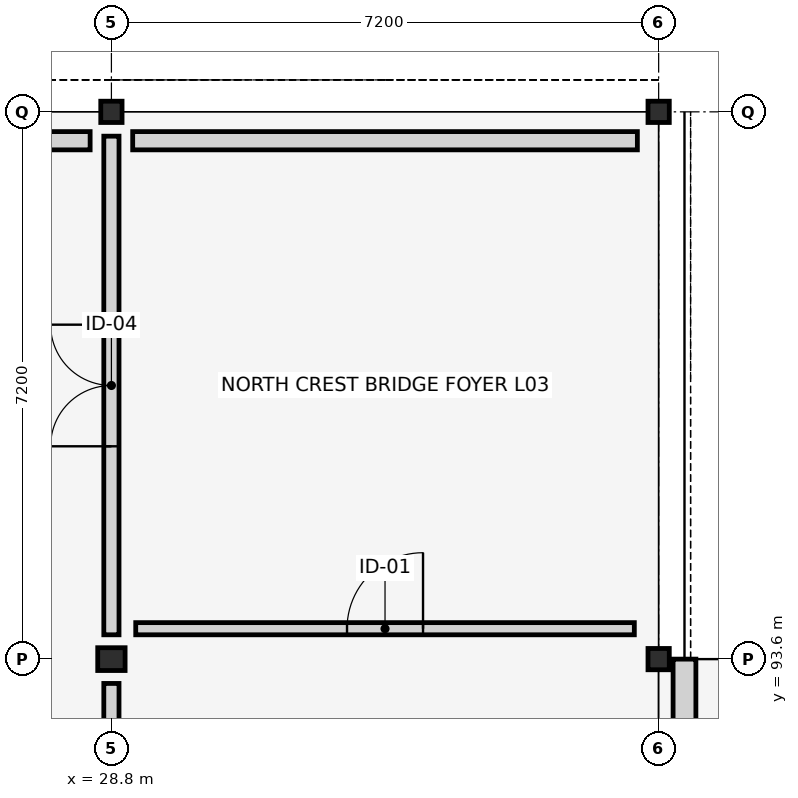
"""IFC4 building model, lengths in metres.
Left out: names, types, materials, properties, quantities, classifications, styles, units other than length and angle.
Written with IfcOpenShell. Run it as: python <this file> out.ifc"""

import sys

from ifc_helpers import new_model, si_unit, direction, frame, frame_2d, origin, origin_2d, place, context, subcontext, project, spatial, rectangle, i_section, extrude, element, fill, save


model = new_model("IFC4")
c1 = context("Model", 3, precision=1e-05, world=origin(), true_north=direction((0.0, 1.0)))
c2 = subcontext(c1, "Body", "Model", "MODEL_VIEW")
j1 = project(units=[si_unit("LENGTHUNIT", "METRE"), si_unit("PLANEANGLEUNIT", "RADIAN")], contexts=[c1])
p1 = place(None, origin())
s1 = spatial("IfcSite", under=j1, at=p1, CompositionType="ELEMENT")
p2 = place(p1, origin())
s2 = spatial("IfcBuilding", under=s1, at=p2, CompositionType="ELEMENT")
p3 = place(p2, frame((0.0, 0.0, 12.9)))
s3 = spatial("IfcBuildingStorey", under=s2, at=p3, CompositionType="ELEMENT", Elevation=12.9)
p4 = place(p3, frame((28.8, 93.6, 0.0), z_axis=(0.0, 0.0, 1.0), x_axis=(0.0, 1.0, 0.0)))
e1 = element("IfcColumn", 1, at=p4, inside=s3, PredefinedType="COLUMN", context=c2, shape_type="SweptSolid", body=[
    extrude(i_section(OverallWidth=0.3, OverallDepth=0.36, WebThickness=0.012, FlangeThickness=0.022, FilletRadius=0.027, at=origin_2d()), origin(), (0.0, 0.0, 1.0), 4.2),
])
for number, where, z_axis, x_axis in (
    (2, (28.8, 100.8, 0.0), (0.0, 0.0, 1.0), (1.0, 0.0, 0.0)),
    (3, (36.0, 93.6, 0.0), (0.0, 0.0, 1.0), (1.0, 0.0, 0.0)),
    (4, (36.0, 100.8, 0.0), (0.0, 0.0, 1.0), (0.0, 1.0, 0.0)),
):
    element("IfcColumn", number, at=place(p3, frame(where, z_axis=z_axis, x_axis=x_axis)), inside=s3, PredefinedType="COLUMN", context=c2, shape_type="SweptSolid", body=[
        extrude(i_section(OverallWidth=0.28, OverallDepth=0.28, WebThickness=0.01, FlangeThickness=0.018, FilletRadius=0.024, at=origin_2d()), origin(), (0.0, 0.0, 1.0), 4.2),
    ])
p5 = place(p3, frame((36.34, 86.4, 0.0), z_axis=(0.0, 0.0, 1.0), x_axis=(0.0, 1.0, 0.0)))
e5 = element("IfcWall", 5, at=p5, inside=s3, PredefinedType="STANDARD", context=c2, shape_type="SweptSolid", body=[
    extrude(rectangle(XDim=7.2, YDim=0.3, at=frame_2d((3.6, 0.0))), origin(), (0.0, 0.0, 1.0), 3.65),
])
p6 = place(p5, frame((2.65, 0.0, 0.0)))
e6 = element("IfcOpeningElement", 6, at=p6, cuts=e5, PredefinedType="OPENING", context=c2, shape_type="SweptSolid", body=[
    extrude(rectangle(XDim=1.9, YDim=2.45, at=frame_2d((0.95, 1.225))), frame((0.0, 0.16, 0.0), z_axis=(0.0, -1.0, 0.0), x_axis=(1.0, 0.0, 0.0)), (0.0, 0.0, 1.0), 0.32),
])
p7 = place(p3, frame((28.52, 100.42, 0.0), z_axis=(0.0, 0.0, 1.0), x_axis=(-1.0, 0.0, 0.0)))
e7 = element("IfcWall", 7, at=p7, inside=s3, PredefinedType="STANDARD", context=c2, shape_type="SweptSolid", body=[
    extrude(rectangle(XDim=6.64, YDim=0.24, at=frame_2d((3.32, 0.0))), origin(), (0.0, 0.0, 1.0), 3.58),
])
p8 = place(p3, frame((35.72, 100.42, 0.0), z_axis=(0.0, 0.0, 1.0), x_axis=(-1.0, 0.0, 0.0)))
e8 = element("IfcWall", 8, at=p8, inside=s3, PredefinedType="STANDARD", context=c2, shape_type="SweptSolid", body=[
    extrude(rectangle(XDim=6.64, YDim=0.24, at=frame_2d((3.32, 0.0))), origin(), (0.0, 0.0, 1.0), 3.58),
])
p9 = place(p3, frame((28.8, 72.32, 0.0), z_axis=(0.0, 0.0, 1.0), x_axis=(0.0, 1.0, 0.0)))
e9 = element("IfcWall", 9, at=p9, inside=s3, PredefinedType="PARTITIONING", context=c2, shape_type="SweptSolid", body=[
    extrude(rectangle(XDim=20.96, YDim=0.2, at=frame_2d((10.48, 0.0))), origin(), (0.0, 0.0, 1.0), 3.15),
])
p10 = place(p9, frame((9.73, 0.0, 0.0)))
e10 = element("IfcOpeningElement", 10, at=p10, cuts=e9, PredefinedType="OPENING", context=c2, shape_type="SweptSolid", body=[
    extrude(rectangle(XDim=1.5, YDim=2.25, at=frame_2d((0.75, 1.125))), frame((0.0, 0.11, 0.0), z_axis=(0.0, -1.0, 0.0), x_axis=(1.0, 0.0, 0.0)), (0.0, 0.0, 1.0), 0.22),
])
p11 = place(p3, frame((28.8, 93.92, 0.0), z_axis=(0.0, 0.0, 1.0), x_axis=(0.0, 1.0, 0.0)))
e11 = element("IfcWall", 11, at=p11, inside=s3, PredefinedType="PARTITIONING", context=c2, shape_type="SweptSolid", body=[
    extrude(rectangle(XDim=6.56, YDim=0.2, at=frame_2d((3.28, 0.0))), origin(), (0.0, 0.0, 1.0), 3.15),
])
p12 = place(p11, frame((2.48, 0.0, 0.0)))
e12 = element("IfcOpeningElement", 12, at=p12, cuts=e11, PredefinedType="OPENING", context=c2, shape_type="SweptSolid", body=[
    extrude(rectangle(XDim=1.6, YDim=2.35, at=frame_2d((0.8, 1.175))), frame((0.0, 0.11, 0.0), z_axis=(0.0, -1.0, 0.0), x_axis=(1.0, 0.0, 0.0)), (0.0, 0.0, 1.0), 0.22),
])
p13 = place(p3, frame((29.12, 94.0, 0.0), z_axis=(0.0, 0.0, 1.0), x_axis=(1.0, 0.0, 0.0)))
e13 = element("IfcWall", 13, at=p13, inside=s3, PredefinedType="PARTITIONING", context=c2, shape_type="SweptSolid", body=[
    extrude(rectangle(XDim=6.56, YDim=0.16, at=frame_2d((3.28, 0.0))), origin(), (0.0, 0.0, 1.0), 3.15),
])
p14 = place(p13, frame((2.78, 0.0, 0.0)))
e14 = element("IfcOpeningElement", 14, at=p14, cuts=e13, PredefinedType="OPENING", context=c2, shape_type="SweptSolid", body=[
    extrude(rectangle(XDim=1.0, YDim=2.15, at=frame_2d((0.5, 1.075))), frame((0.0, 0.09, 0.0), z_axis=(0.0, -1.0, 0.0), x_axis=(1.0, 0.0, 0.0)), (0.0, 0.0, 1.0), 0.18),
])
p15 = place(p12, origin())
e15 = element("IfcDoor", 15, at=p15, inside=s3, OperationType="DOUBLE_DOOR_SINGLE_SWING", PredefinedType="DOOR", context=c2, shape_type="SweptSolid", body=[
    extrude(rectangle(XDim=1.6, YDim=2.35, at=frame_2d((0.8, 1.175))), frame((0.0, 0.025, 0.0), z_axis=(0.0, -1.0, 0.0), x_axis=(1.0, 0.0, 0.0)), (0.0, 0.0, 1.0), 0.05),
])
fill(e12, e15)
p16 = place(p14, origin())
e16 = element("IfcDoor", 16, at=p16, inside=s3, OperationType="SINGLE_SWING_RIGHT", PredefinedType="DOOR", context=c2, shape_type="SweptSolid", body=[
    extrude(rectangle(XDim=1.0, YDim=2.15, at=frame_2d((0.5, 1.075))), frame((0.0, 0.025, 0.0), z_axis=(0.0, -1.0, 0.0), x_axis=(1.0, 0.0, 0.0)), (0.0, 0.0, 1.0), 0.05),
])
fill(e14, e16)
save(model, sys.argv[1])
